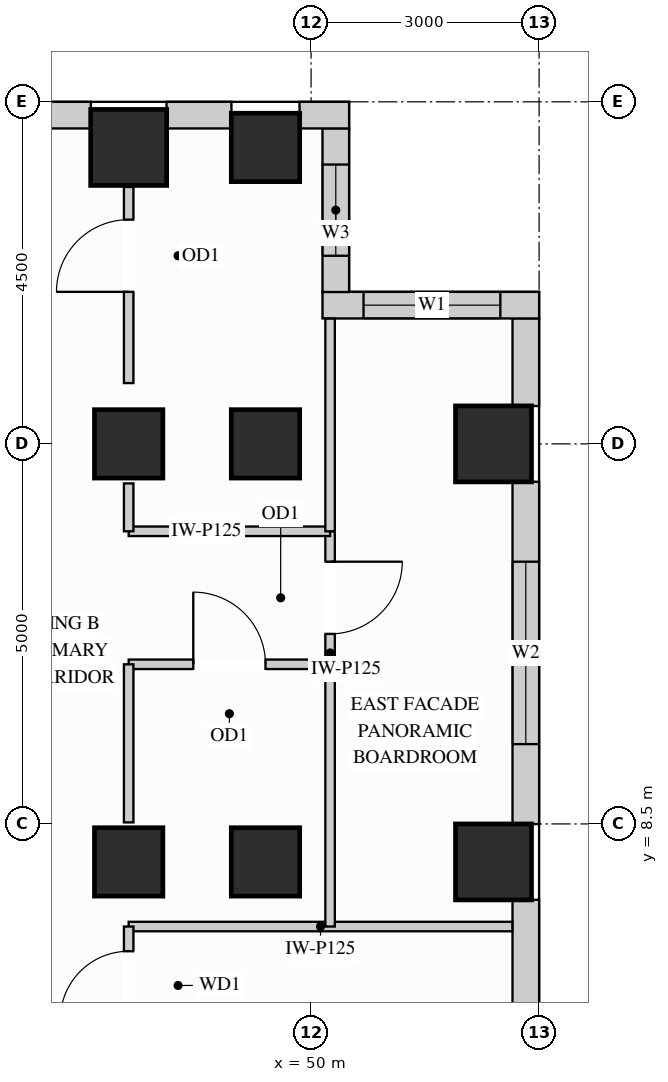
"""IFC4 building model, lengths in metres.
Left out: names, types, materials, properties, quantities, classifications, styles, units other than length and angle.
Written with IfcOpenShell. Run it as: python <this file> out.ifc"""

import sys

from ifc_helpers import new_model, si_unit, direction, frame, frame_2d, origin, origin_2d, place, context, subcontext, project, spatial, rectangle, extrude, source, transform, mapped, element, fill, save


model = new_model("IFC4")
c1 = context("Model", 3, precision=1e-05, world=origin(), true_north=direction((0.0, 1.0)))
c2 = subcontext(c1, "Body", "Model", "MODEL_VIEW")
j1 = project(units=[si_unit("LENGTHUNIT", "METRE"), si_unit("PLANEANGLEUNIT", "RADIAN")], contexts=[c1])
p1 = place(None, origin())
s1 = spatial("IfcSite", under=j1, at=p1, CompositionType="ELEMENT")
p2 = place(p1, origin())
s2 = spatial("IfcBuilding", under=s1, at=p2, CompositionType="ELEMENT")
p3 = place(p2, frame((0.0, 0.0, 186.3)))
s3 = spatial("IfcBuildingStorey", under=s2, at=p3, CompositionType="ELEMENT", Elevation=186.3)
m1 = source(origin(), c2, "Body", "SweptSolid", [
    extrude(rectangle(XDim=0.9, YDim=0.9, at=origin_2d()), origin(), (0.0, 0.0, 1.0), 3.4),
])
for number, where, z_axis, x_axis in (
    (1, (47.6, 13.5, 0.0), (0.0, 0.0, 1.0), (1.0, 0.0, 0.0)),
    (2, (47.6, 8.0, 0.0), (0.0, 0.0, 1.0), (1.0, 0.0, 0.0)),
    (3, (49.4, 13.5, 0.0), (0.0, 0.0, 1.0), (1.0, 0.0, 0.0)),
    (4, (49.4, 17.4, 0.0), (0.0, 0.0, 1.0), (1.0, 0.0, 0.0)),
    (5, (49.4, 8.0, 0.0), (0.0, 0.0, 1.0), (1.0, 0.0, 0.0)),
):
    element("IfcColumn", number, at=place(p3, frame(where, z_axis=z_axis, x_axis=x_axis)), inside=s3, PredefinedType="COLUMN", context=c2, shape_type="MappedRepresentation", body=[
        mapped(m1, transform((0.0, 0.0, 0.0), x_axis=(1.0, 0.0, 0.0), y_axis=(0.0, 1.0, 0.0), z_axis=(0.0, 0.0, 1.0))),
    ])
m2 = source(origin(), c2, "Body", "SweptSolid", [
    extrude(rectangle(XDim=1.0, YDim=1.0, at=origin_2d()), origin(), (0.0, 0.0, 1.0), 3.4),
])
for number, where, z_axis, x_axis in (
    (6, (47.6, 17.4, 0.0), (0.0, 0.0, 1.0), (1.0, 0.0, 0.0)),
    (7, (52.4, 13.5, 0.0), (0.0, 0.0, 1.0), (1.0, 0.0, 0.0)),
    (8, (52.4, 8.0, 0.0), (0.0, 0.0, 1.0), (1.0, 0.0, 0.0)),
):
    element("IfcColumn", number, at=place(p3, frame(where, z_axis=z_axis, x_axis=x_axis)), inside=s3, PredefinedType="COLUMN", context=c2, shape_type="MappedRepresentation", body=[
        mapped(m2, transform((0.0, 0.0, 0.0), x_axis=(1.0, 0.0, 0.0), y_axis=(0.0, 1.0, 0.0), z_axis=(0.0, 0.0, 1.0))),
    ])
m3 = source(origin(), c2, "Body", "SweptSolid", [
    extrude(rectangle(XDim=3.504, YDim=0.35, at=frame_2d((1.752, 0.0))), origin(), (0.0, 0.0, 1.0), 2.612),
])
p4 = place(p3, frame((52.825, 3.998, 0.0), z_axis=(0.0, 0.0, 1.0), x_axis=(0.0, 1.0, 0.0)))
e9 = element("IfcWall", 9, at=p4, inside=s3, PredefinedType="SOLIDWALL", context=c2, shape_type="MappedRepresentation", body=[
    mapped(m3, transform((0.0, 0.0, 0.0), x_axis=(1.0, 0.0, 0.0), y_axis=(0.0, 1.0, 0.0), z_axis=(0.0, 0.0, 1.0))),
])
p5 = place(p3, frame((52.825, 8.498, 0.0), z_axis=(0.0, 0.0, 1.0), x_axis=(0.0, 1.0, 0.0)))
e10 = element("IfcWall", 10, at=p5, inside=s3, PredefinedType="SOLIDWALL", context=c2, shape_type="SweptSolid", body=[
    extrude(rectangle(XDim=4.504, YDim=0.35, at=frame_2d((2.252, 0.0))), origin(), (0.0, 0.0, 1.0), 2.612),
])
p6 = place(p5, frame((1.052, 0.0, 0.78)))
e11 = element("IfcOpeningElement", 11, at=p6, cuts=e10, PredefinedType="OPENING", context=c2, shape_type="SweptSolid", body=[
    extrude(rectangle(XDim=2.4, YDim=1.652, at=frame_2d((1.2, 0.826))), frame((0.0, 0.185, 0.0), z_axis=(0.0, -1.0, 0.0), x_axis=(1.0, 0.0, 0.0)), (0.0, 0.0, 1.0), 0.37),
])
m4 = source(origin(), c2, "Body", "SweptSolid", [
    extrude(rectangle(XDim=1.154, YDim=0.35, at=frame_2d((0.577, 0.0))), origin(), (0.0, 0.0, 1.0), 3.385),
])
p7 = place(p3, frame((52.825, 13.998, 0.0), z_axis=(0.0, 0.0, 1.0), x_axis=(0.0, 1.0, 0.0)))
e12 = element("IfcWall", 12, at=p7, inside=s3, PredefinedType="SOLIDWALL", context=c2, shape_type="MappedRepresentation", body=[
    mapped(m4, transform((0.0, 0.0, 0.0), x_axis=(1.0, 0.0, 0.0), y_axis=(0.0, 1.0, 0.0), z_axis=(0.0, 0.0, 1.0))),
])
p8 = place(p3, frame((53.0, 15.325, 0.0), z_axis=(0.0, 0.0, 1.0), x_axis=(-1.0, 0.0, 0.0)))
e13 = element("IfcWall", 13, at=p8, inside=s3, PredefinedType="SOLIDWALL", context=c2, shape_type="SweptSolid", body=[
    extrude(rectangle(XDim=2.85, YDim=0.35, at=frame_2d((1.425, 0.0))), origin(), (0.0, 0.0, 1.0), 3.385),
])
p9 = place(p8, frame((0.51, 0.0, 0.78)))
e14 = element("IfcOpeningElement", 14, at=p9, cuts=e13, PredefinedType="OPENING", context=c2, shape_type="SweptSolid", body=[
    extrude(rectangle(XDim=1.8, YDim=2.1, at=frame_2d((0.9, 1.05))), frame((0.0, 0.185, 0.0), z_axis=(0.0, -1.0, 0.0), x_axis=(1.0, 0.0, 0.0)), (0.0, 0.0, 1.0), 0.37),
])
p10 = place(p3, frame((50.325, 15.498, 0.0), z_axis=(0.0, 0.0, 1.0), x_axis=(0.0, 1.0, 0.0)))
e15 = element("IfcWall", 15, at=p10, inside=s3, PredefinedType="SOLIDWALL", context=c2, shape_type="SweptSolid", body=[
    extrude(rectangle(XDim=2.154, YDim=0.35, at=frame_2d((1.077, 0.0))), origin(), (0.0, 0.0, 1.0), 3.385),
])
p11 = place(p10, frame((0.477, 0.0, 0.78)))
e16 = element("IfcOpeningElement", 16, at=p11, cuts=e15, PredefinedType="OPENING", context=c2, shape_type="SweptSolid", body=[
    extrude(rectangle(XDim=1.2, YDim=2.1, at=frame_2d((0.6, 1.05))), frame((0.0, 0.185, 0.0), z_axis=(0.0, -1.0, 0.0), x_axis=(1.0, 0.0, 0.0)), (0.0, 0.0, 1.0), 0.37),
])
m5 = source(origin(), c2, "Body", "SweptSolid", [
    extrude(rectangle(XDim=0.652, YDim=0.35, at=frame_2d((0.326, 0.0))), origin(), (0.0, 0.0, 1.0), 3.385),
])
p12 = place(p3, frame((50.5, 17.825, 0.0), z_axis=(0.0, 0.0, 1.0), x_axis=(-1.0, 0.0, 0.0)))
e17 = element("IfcWall", 17, at=p12, inside=s3, PredefinedType="SOLIDWALL", context=c2, shape_type="MappedRepresentation", body=[
    mapped(m5, transform((0.0, 0.0, 0.0), x_axis=(1.0, 0.0, 0.0), y_axis=(0.0, 1.0, 0.0), z_axis=(0.0, 0.0, 1.0))),
])
m6 = source(origin(), c2, "Body", "SweptSolid", [
    extrude(rectangle(XDim=0.854, YDim=0.35, at=frame_2d((0.427, 0.0))), origin(), (0.0, 0.0, 1.0), 3.385),
])
p13 = place(p3, frame((48.952, 17.825, 0.0), z_axis=(0.0, 0.0, 1.0), x_axis=(-1.0, 0.0, 0.0)))
e18 = element("IfcWall", 18, at=p13, inside=s3, PredefinedType="SOLIDWALL", context=c2, shape_type="MappedRepresentation", body=[
    mapped(m6, transform((0.0, 0.0, 0.0), x_axis=(1.0, 0.0, 0.0), y_axis=(0.0, 1.0, 0.0), z_axis=(0.0, 0.0, 1.0))),
])
p14 = place(p3, frame((47.102, 17.825, 0.0), z_axis=(0.0, 0.0, 1.0), x_axis=(-1.0, 0.0, 0.0)))
e19 = element("IfcWall", 19, at=p14, inside=s3, PredefinedType="SOLIDWALL", context=c2, shape_type="SweptSolid", body=[
    extrude(rectangle(XDim=6.604, YDim=0.35, at=frame_2d((3.302, 0.0))), origin(), (0.0, 0.0, 1.0), 2.612),
])
p15 = place(p14, frame((1.849, 0.0, 0.78)))
e20 = element("IfcOpeningElement", 20, at=p15, cuts=e19, PredefinedType="OPENING", context=c2, shape_type="SweptSolid", body=[
    extrude(rectangle(XDim=1.8, YDim=1.652, at=frame_2d((0.9, 0.826))), frame((0.0, 0.185, 0.0), z_axis=(0.0, -1.0, 0.0), x_axis=(1.0, 0.0, 0.0)), (0.0, 0.0, 1.0), 0.37),
])
p16 = place(p14, frame((4.067, 0.0, 0.78)))
e21 = element("IfcOpeningElement", 21, at=p16, cuts=e19, PredefinedType="OPENING", context=c2, shape_type="SweptSolid", body=[
    extrude(rectangle(XDim=1.8, YDim=1.652, at=frame_2d((0.9, 0.826))), frame((0.0, 0.185, 0.0), z_axis=(0.0, -1.0, 0.0), x_axis=(1.0, 0.0, 0.0)), (0.0, 0.0, 1.0), 0.37),
])
p17 = place(p3, frame((50.25, 10.6, 0.0), z_axis=(0.0, 0.0, 1.0), x_axis=(0.0, 1.0, 0.0)))
e22 = element("IfcWall", 22, at=p17, inside=s3, PredefinedType="PARTITIONING", context=c2, shape_type="SweptSolid", body=[
    extrude(rectangle(XDim=1.75, YDim=0.125, at=frame_2d((0.875, 0.0))), origin(), (0.0, 0.0, 1.0), 3.385),
])
p18 = place(p17, frame((0.4, 0.0, 0.0)))
e23 = element("IfcOpeningElement", 23, at=p18, cuts=e22, PredefinedType="OPENING", context=c2, shape_type="SweptSolid", body=[
    extrude(rectangle(XDim=0.95, YDim=2.15, at=frame_2d((0.475, 1.075))), frame((0.0, 0.073, 0.0), z_axis=(0.0, -1.0, 0.0), x_axis=(1.0, 0.0, 0.0)), (0.0, 0.0, 1.0), 0.145),
])
m7 = source(origin(), c2, "Body", "SweptSolid", [
    extrude(rectangle(XDim=5.048, YDim=0.125, at=frame_2d((2.524, 0.0))), origin(), (0.0, 0.0, 1.0), 3.385),
])
p19 = place(p3, frame((47.6, 7.15, 0.0), z_axis=(0.0, 0.0, 1.0), x_axis=(1.0, 0.0, 0.0)))
e24 = element("IfcWall", 24, at=p19, inside=s3, PredefinedType="PARTITIONING", context=c2, shape_type="MappedRepresentation", body=[
    mapped(m7, transform((0.0, 0.0, 0.0), x_axis=(1.0, 0.0, 0.0), y_axis=(0.0, 1.0, 0.0), z_axis=(0.0, 0.0, 1.0))),
])
m8 = source(origin(), c2, "Body", "SweptSolid", [
    extrude(rectangle(XDim=2.65, YDim=0.125, at=frame_2d((1.325, 0.0))), origin(), (0.0, 0.0, 1.0), 3.385),
])
p20 = place(p3, frame((47.6, 12.35, 0.0), z_axis=(0.0, 0.0, 1.0), x_axis=(1.0, 0.0, 0.0)))
e25 = element("IfcWall", 25, at=p20, inside=s3, PredefinedType="PARTITIONING", context=c2, shape_type="MappedRepresentation", body=[
    mapped(m8, transform((0.0, 0.0, 0.0), x_axis=(1.0, 0.0, 0.0), y_axis=(0.0, 1.0, 0.0), z_axis=(0.0, 0.0, 1.0))),
])
p21 = place(p3, frame((47.6, 10.6, 0.0), z_axis=(0.0, 0.0, 1.0), x_axis=(1.0, 0.0, 0.0)))
e26 = element("IfcWall", 26, at=p21, inside=s3, PredefinedType="PARTITIONING", context=c2, shape_type="SweptSolid", body=[
    extrude(rectangle(XDim=2.65, YDim=0.125, at=frame_2d((1.325, 0.0))), origin(), (0.0, 0.0, 1.0), 2.773),
])
p22 = place(p21, frame((0.85, 0.0, 0.0)))
e27 = element("IfcOpeningElement", 27, at=p22, cuts=e26, PredefinedType="OPENING", context=c2, shape_type="SweptSolid", body=[
    extrude(rectangle(XDim=0.95, YDim=2.15, at=frame_2d((0.475, 1.075))), frame((0.0, 0.073, 0.0), z_axis=(0.0, -1.0, 0.0), x_axis=(1.0, 0.0, 0.0)), (0.0, 0.0, 1.0), 0.145),
])
m9 = source(origin(), c2, "Body", "SweptSolid", [
    extrude(rectangle(XDim=3.45, YDim=0.125, at=frame_2d((1.725, 0.0))), origin(), (0.0, 0.0, 1.0), 3.385),
])
p23 = place(p3, frame((50.25, 7.15, 0.0), z_axis=(0.0, 0.0, 1.0), x_axis=(0.0, 1.0, 0.0)))
e28 = element("IfcWall", 28, at=p23, inside=s3, PredefinedType="PARTITIONING", context=c2, shape_type="MappedRepresentation", body=[
    mapped(m9, transform((0.0, 0.0, 0.0), x_axis=(1.0, 0.0, 0.0), y_axis=(0.0, 1.0, 0.0), z_axis=(0.0, 0.0, 1.0))),
])
m10 = source(origin(), c2, "Body", "SweptSolid", [
    extrude(rectangle(XDim=2.798, YDim=0.125, at=frame_2d((1.399, 0.0))), origin(), (0.0, 0.0, 1.0), 3.385),
])
p24 = place(p3, frame((50.25, 12.35, 0.0), z_axis=(0.0, 0.0, 1.0), x_axis=(0.0, 1.0, 0.0)))
e29 = element("IfcWall", 29, at=p24, inside=s3, PredefinedType="PARTITIONING", context=c2, shape_type="MappedRepresentation", body=[
    mapped(m10, transform((0.0, 0.0, 0.0), x_axis=(1.0, 0.0, 0.0), y_axis=(0.0, 1.0, 0.0), z_axis=(0.0, 0.0, 1.0))),
])
m11 = source(origin(), c2, "Body", "SweptSolid", [
    extrude(rectangle(XDim=2.08, YDim=0.125, at=frame_2d((1.04, 0.0))), origin(), (0.0, 0.0, 1.0), 2.773),
])
p25 = place(p3, frame((47.6, 8.52, 0.0), z_axis=(0.0, 0.0, 1.0), x_axis=(0.0, 1.0, 0.0)))
e30 = element("IfcWall", 30, at=p25, inside=s3, PredefinedType="PARTITIONING", context=c2, shape_type="MappedRepresentation", body=[
    mapped(m11, transform((0.0, 0.0, 0.0), x_axis=(1.0, 0.0, 0.0), y_axis=(0.0, 1.0, 0.0), z_axis=(0.0, 0.0, 1.0))),
])
p26 = place(p3, frame((47.6, 14.3, 0.0), z_axis=(0.0, 0.0, 1.0), x_axis=(0.0, 1.0, 0.0)))
e31 = element("IfcWall", 31, at=p26, inside=s3, PredefinedType="PARTITIONING", context=c2, shape_type="SweptSolid", body=[
    extrude(rectangle(XDim=2.58, YDim=0.125, at=frame_2d((1.29, 0.0))), origin(), (0.0, 0.0, 1.0), 2.773),
])
p27 = place(p26, frame((1.2, 0.0, 0.0)))
e32 = element("IfcOpeningElement", 32, at=p27, cuts=e31, PredefinedType="OPENING", context=c2, shape_type="SweptSolid", body=[
    extrude(rectangle(XDim=0.95, YDim=2.15, at=frame_2d((0.475, 1.075))), frame((0.0, 0.073, 0.0), z_axis=(0.0, -1.0, 0.0), x_axis=(1.0, 0.0, 0.0)), (0.0, 0.0, 1.0), 0.145),
])
m12 = source(origin(), c2, "Body", "SweptSolid", [
    extrude(rectangle(XDim=0.63, YDim=0.125, at=frame_2d((0.315, 0.0))), origin(), (0.0, 0.0, 1.0), 2.773),
])
p28 = place(p3, frame((47.6, 12.35, 0.0), z_axis=(0.0, 0.0, 1.0), x_axis=(0.0, 1.0, 0.0)))
e33 = element("IfcWall", 33, at=p28, inside=s3, PredefinedType="PARTITIONING", context=c2, shape_type="MappedRepresentation", body=[
    mapped(m12, transform((0.0, 0.0, 0.0), x_axis=(1.0, 0.0, 0.0), y_axis=(0.0, 1.0, 0.0), z_axis=(0.0, 0.0, 1.0))),
])
p29 = place(p3, frame((47.6, 5.65, 0.0), z_axis=(0.0, 0.0, 1.0), x_axis=(0.0, 1.0, 0.0)))
e34 = element("IfcWall", 34, at=p29, inside=s3, PredefinedType="PARTITIONING", context=c2, shape_type="SweptSolid", body=[
    extrude(rectangle(XDim=1.5, YDim=0.125, at=frame_2d((0.75, 0.0))), origin(), (0.0, 0.0, 1.0), 2.773),
])
p30 = place(p29, frame((0.275, 0.0, 0.0)))
e35 = element("IfcOpeningElement", 35, at=p30, cuts=e34, PredefinedType="OPENING", context=c2, shape_type="SweptSolid", body=[
    extrude(rectangle(XDim=0.9, YDim=2.15, at=frame_2d((0.45, 1.075))), frame((0.0, 0.073, 0.0), z_axis=(0.0, -1.0, 0.0), x_axis=(1.0, 0.0, 0.0)), (0.0, 0.0, 1.0), 0.145),
])
m13 = source(origin(), c2, "Body", "SweptSolid", [
    extrude(rectangle(XDim=0.95, YDim=2.15, at=frame_2d((0.475, 1.075))), frame((0.0, 0.025, 0.0), z_axis=(0.0, -1.0, 0.0), x_axis=(1.0, 0.0, 0.0)), (0.0, 0.0, 1.0), 0.05),
])
p31 = place(p22, origin())
e36 = element("IfcDoor", 36, at=p31, inside=s3, OperationType="SINGLE_SWING_LEFT", PredefinedType="DOOR", context=c2, shape_type="MappedRepresentation", body=[
    mapped(m13, transform((0.0, 0.0, 0.0), x_axis=(1.0, 0.0, 0.0), y_axis=(0.0, 1.0, 0.0), z_axis=(0.0, 0.0, 1.0))),
])
fill(e27, e36)
p32 = place(p18, origin())
e37 = element("IfcDoor", 37, at=p32, inside=s3, OperationType="SINGLE_SWING_RIGHT", PredefinedType="DOOR", context=c2, shape_type="MappedRepresentation", body=[
    mapped(m13, transform((0.0, 0.0, 0.0), x_axis=(1.0, 0.0, 0.0), y_axis=(0.0, 1.0, 0.0), z_axis=(0.0, 0.0, 1.0))),
])
fill(e23, e37)
p33 = place(p27, origin())
e38 = element("IfcDoor", 38, at=p33, inside=s3, OperationType="SINGLE_SWING_LEFT", PredefinedType="DOOR", context=c2, shape_type="MappedRepresentation", body=[
    mapped(m13, transform((0.0, 0.0, 0.0), x_axis=(1.0, 0.0, 0.0), y_axis=(0.0, 1.0, 0.0), z_axis=(0.0, 0.0, 1.0))),
])
fill(e32, e38)
m14 = source(origin(), c2, "Body", "SweptSolid", [
    extrude(rectangle(XDim=0.9, YDim=2.15, at=frame_2d((0.45, 1.075))), frame((0.0, 0.025, 0.0), z_axis=(0.0, -1.0, 0.0), x_axis=(1.0, 0.0, 0.0)), (0.0, 0.0, 1.0), 0.05),
])
p34 = place(p30, origin())
e39 = element("IfcDoor", 39, at=p34, inside=s3, OperationType="SINGLE_SWING_LEFT", PredefinedType="DOOR", context=c2, shape_type="MappedRepresentation", body=[
    mapped(m14, transform((0.0, 0.0, 0.0), x_axis=(1.0, 0.0, 0.0), y_axis=(0.0, 1.0, 0.0), z_axis=(0.0, 0.0, 1.0))),
])
fill(e35, e39)
m15 = source(origin(), c2, "Body", "SweptSolid", [
    extrude(rectangle(XDim=1.8, YDim=2.1, at=frame_2d((0.9, 1.05))), frame((0.0, 0.03, 0.0), z_axis=(0.0, -1.0, 0.0), x_axis=(1.0, 0.0, 0.0)), (0.0, 0.0, 1.0), 0.06),
])
p35 = place(p9, origin())
e40 = element("IfcWindow", 40, at=p35, inside=s3, PartitioningType="SINGLE_PANEL", PredefinedType="WINDOW", context=c2, shape_type="MappedRepresentation", body=[
    mapped(m15, transform((0.0, 0.0, 0.0), x_axis=(1.0, 0.0, 0.0), y_axis=(0.0, 1.0, 0.0), z_axis=(0.0, 0.0, 1.0))),
])
fill(e14, e40)
m16 = source(origin(), c2, "Body", "SweptSolid", [
    extrude(rectangle(XDim=2.4, YDim=1.652, at=frame_2d((1.2, 0.826))), frame((0.0, 0.03, 0.0), z_axis=(0.0, -1.0, 0.0), x_axis=(1.0, 0.0, 0.0)), (0.0, 0.0, 1.0), 0.06),
])
p36 = place(p6, origin())
e41 = element("IfcWindow", 41, at=p36, inside=s3, PartitioningType="SINGLE_PANEL", PredefinedType="WINDOW", context=c2, shape_type="MappedRepresentation", body=[
    mapped(m16, transform((0.0, 0.0, 0.0), x_axis=(1.0, 0.0, 0.0), y_axis=(0.0, 1.0, 0.0), z_axis=(0.0, 0.0, 1.0))),
])
fill(e11, e41)
m17 = source(origin(), c2, "Body", "SweptSolid", [
    extrude(rectangle(XDim=1.2, YDim=2.1, at=frame_2d((0.6, 1.05))), frame((0.0, 0.03, 0.0), z_axis=(0.0, -1.0, 0.0), x_axis=(1.0, 0.0, 0.0)), (0.0, 0.0, 1.0), 0.06),
])
p37 = place(p11, origin())
e42 = element("IfcWindow", 42, at=p37, inside=s3, PartitioningType="SINGLE_PANEL", PredefinedType="WINDOW", context=c2, shape_type="MappedRepresentation", body=[
    mapped(m17, transform((0.0, 0.0, 0.0), x_axis=(1.0, 0.0, 0.0), y_axis=(0.0, 1.0, 0.0), z_axis=(0.0, 0.0, 1.0))),
])
fill(e16, e42)
save(model, sys.argv[1])
